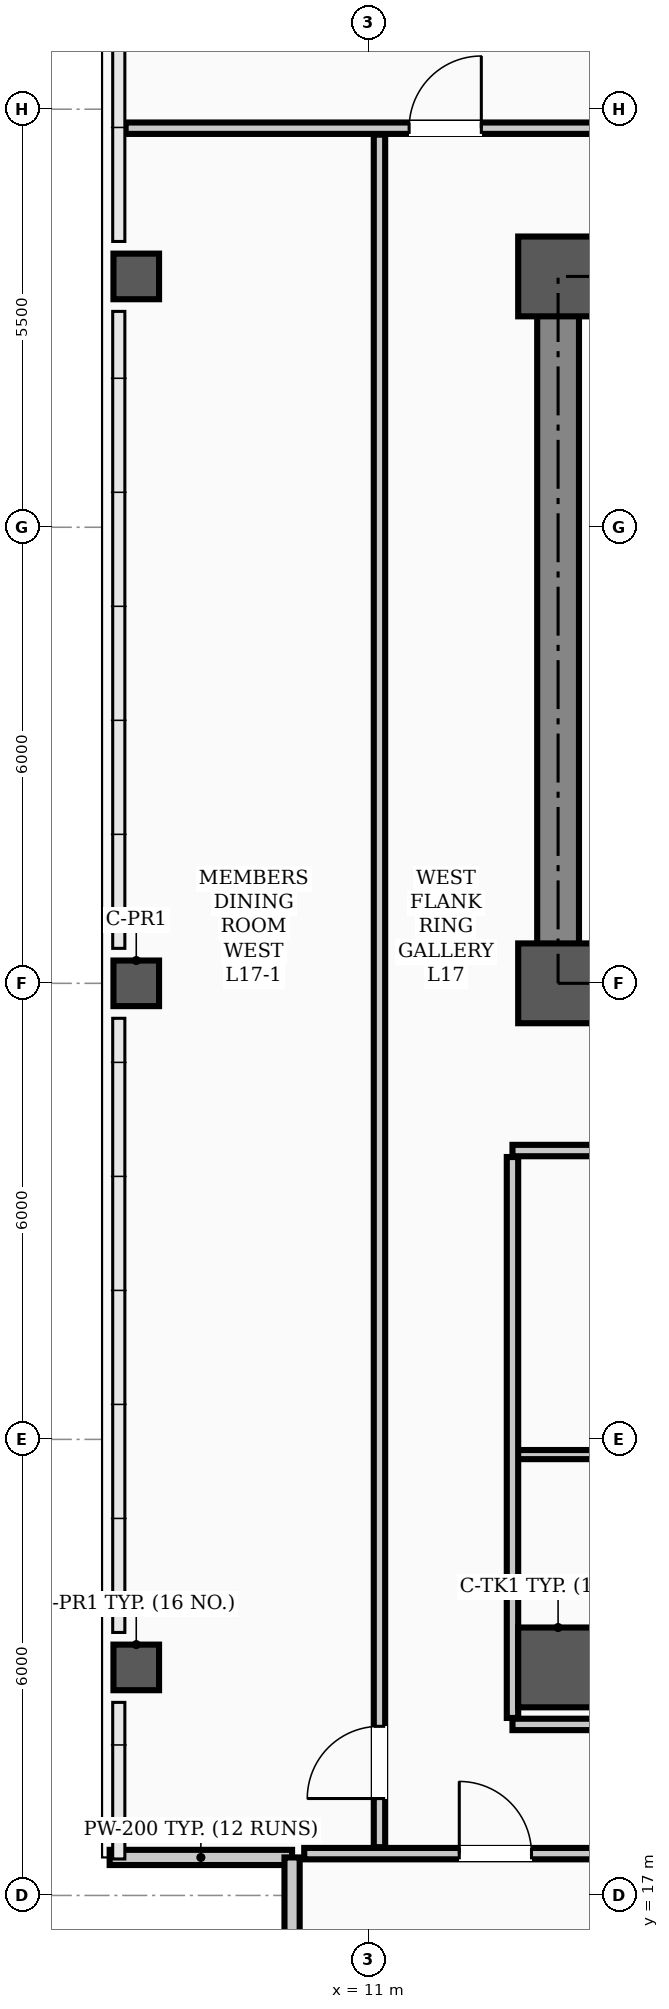
"""IFC4 building model, lengths in metres.
Left out: names, types, materials, properties, quantities, classifications, styles, units other than length and angle.
Written with IfcOpenShell. Run it as: python <this file> out.ifc"""

import sys

from ifc_helpers import new_model, si_unit, direction, frame, frame_2d, origin, origin_2d, place, context, subcontext, project, spatial, rectangle, hollow_rectangle, extrude, element, fill, save


model = new_model("IFC4")
c1 = context("Model", 3, precision=1e-05, world=origin(), true_north=direction((0.0, 1.0)))
c2 = subcontext(c1, "Body", "Model", "MODEL_VIEW")
j1 = project(units=[si_unit("LENGTHUNIT", "METRE"), si_unit("PLANEANGLEUNIT", "RADIAN")], contexts=[c1])
p1 = place(None, origin())
s1 = spatial("IfcSite", under=j1, at=p1, CompositionType="ELEMENT")
p2 = place(p1, origin())
s2 = spatial("IfcBuilding", under=s1, at=p2, CompositionType="ELEMENT")
p3 = place(p2, frame((0.0, 0.0, 69.4)))
s3 = spatial("IfcBuildingStorey", under=s2, at=p3, CompositionType="ELEMENT", Elevation=69.4)
for number, where, z_axis, x_axis in (
    (1, (13.5, 29.0, 0.0), (0.0, 0.0, 1.0), (1.0, 0.0, 0.0)),
    (2, (13.5, 38.3, 0.0), (0.0, 0.0, 1.0), (1.0, 0.0, 0.0)),
    (3, (13.5, 20.0, 0.0), (0.0, 0.0, 1.0), (1.0, 0.0, 0.0)),
):
    element("IfcColumn", number, at=place(p3, frame(where, z_axis=z_axis, x_axis=x_axis)), inside=s3, PredefinedType="COLUMN", context=c2, shape_type="SweptSolid", body=[
        extrude(hollow_rectangle(XDim=1.05, YDim=1.05, WallThickness=0.038, InnerFilletRadius=0.019, OuterFilletRadius=0.057, at=origin_2d()), origin(), (0.0, 0.0, 1.0), 3.9),
    ])
for number, where, z_axis, x_axis in (
    (4, (7.95, 20.0, 0.0), (0.0, 0.0, 1.0), (1.0, 0.0, 0.0)),
    (5, (7.95, 29.0, 0.0), (0.0, 0.0, 1.0), (1.0, 0.0, 0.0)),
    (6, (7.95, 38.3, 0.0), (0.0, 0.0, 1.0), (1.0, 0.0, 0.0)),
):
    element("IfcColumn", number, at=place(p3, frame(where, z_axis=z_axis, x_axis=x_axis)), inside=s3, PredefinedType="COLUMN", context=c2, shape_type="SweptSolid", body=[
        extrude(hollow_rectangle(XDim=0.6, YDim=0.6, WallThickness=0.026, InnerFilletRadius=0.013, OuterFilletRadius=0.039, at=origin_2d()), origin(), (0.0, 0.0, 1.0), 3.9),
    ])
for number, where, z_axis, x_axis in (
    (7, (7.6, 17.5, 0.0), (0.0, 0.0, 1.0), (1.0, 0.0, 0.0)),
    (8, (10.0, 17.5, 0.0), (0.0, 0.0, 1.0), (0.0, -1.0, 0.0)),
):
    element("IfcWall", number, at=place(p3, frame(where, z_axis=z_axis, x_axis=x_axis)), inside=s3, PredefinedType="PARAPET", context=c2, shape_type="SweptSolid", body=[
        extrude(rectangle(XDim=2.4, YDim=0.2, at=frame_2d((1.2, 0.0))), origin(), (0.0, 0.0, 1.0), 1.2),
    ])
p4 = place(p3, frame((13.5, 29.0, 0.0), z_axis=(0.0, 0.0, 1.0), x_axis=(1.0, 0.0, 0.0)))
e9 = element("IfcWall", 9, at=p4, inside=s3, PredefinedType="SHEAR", context=c2, shape_type="SweptSolid", body=[
    extrude(rectangle(XDim=30.5, YDim=0.55, at=frame_2d((15.25, 0.0))), origin(), (0.0, 0.0, 1.0), 3.72),
])
p5 = place(p4, frame((1.75, 0.0, 0.0)))
e10 = element("IfcOpeningElement", 10, at=p5, cuts=e9, PredefinedType="OPENING", context=c2, shape_type="SweptSolid", body=[
    extrude(rectangle(XDim=1.1, YDim=2.08, at=frame_2d((0.55, 1.04))), frame((0.0, 0.285, 0.0), z_axis=(0.0, -1.0, 0.0), x_axis=(1.0, 0.0, 0.0)), (0.0, 0.0, 1.0), 0.57),
])
p6 = place(p4, frame((26.7, 0.0, 0.0)))
e11 = element("IfcOpeningElement", 11, at=p6, cuts=e9, PredefinedType="OPENING", context=c2, shape_type="SweptSolid", body=[
    extrude(rectangle(XDim=1.1, YDim=2.08, at=frame_2d((0.55, 1.04))), frame((0.0, 0.285, 0.0), z_axis=(0.0, -1.0, 0.0), x_axis=(1.0, 0.0, 0.0)), (0.0, 0.0, 1.0), 0.57),
])
p7 = place(p4, frame((6.8, 0.0, 0.0)))
e12 = element("IfcOpeningElement", 12, at=p7, cuts=e9, PredefinedType="OPENING", context=c2, shape_type="SweptSolid", body=[
    extrude(rectangle(XDim=1.1, YDim=2.08, at=frame_2d((0.55, 1.04))), frame((0.0, 0.285, 0.0), z_axis=(0.0, -1.0, 0.0), x_axis=(1.0, 0.0, 0.0)), (0.0, 0.0, 1.0), 0.57),
])
p8 = place(p4, frame((13.2, 0.0, 0.0)))
e13 = element("IfcOpeningElement", 13, at=p8, cuts=e9, PredefinedType="OPENING", context=c2, shape_type="SweptSolid", body=[
    extrude(rectangle(XDim=1.6, YDim=2.08, at=frame_2d((0.8, 1.04))), frame((0.0, 0.285, 0.0), z_axis=(0.0, -1.0, 0.0), x_axis=(1.0, 0.0, 0.0)), (0.0, 0.0, 1.0), 0.57),
])
p9 = place(p4, frame((19.5, 0.0, 0.0)))
e14 = element("IfcOpeningElement", 14, at=p9, cuts=e9, PredefinedType="OPENING", context=c2, shape_type="SweptSolid", body=[
    extrude(rectangle(XDim=0.9, YDim=2.08, at=frame_2d((0.45, 1.04))), frame((0.0, 0.285, 0.0), z_axis=(0.0, -1.0, 0.0), x_axis=(1.0, 0.0, 0.0)), (0.0, 0.0, 1.0), 0.57),
])
p10 = place(p4, frame((21.55, 0.0, 0.0)))
e15 = element("IfcOpeningElement", 15, at=p10, cuts=e9, PredefinedType="OPENING", context=c2, shape_type="SweptSolid", body=[
    extrude(rectangle(XDim=0.9, YDim=2.08, at=frame_2d((0.45, 1.04))), frame((0.0, 0.285, 0.0), z_axis=(0.0, -1.0, 0.0), x_axis=(1.0, 0.0, 0.0)), (0.0, 0.0, 1.0), 0.57),
])
p11 = place(p3, frame((13.5, 38.3, 0.0), z_axis=(0.0, 0.0, 1.0), x_axis=(1.0, 0.0, 0.0)))
e16 = element("IfcWall", 16, at=p11, inside=s3, PredefinedType="SHEAR", context=c2, shape_type="SweptSolid", body=[
    extrude(rectangle(XDim=30.5, YDim=0.55, at=frame_2d((15.25, 0.0))), origin(), (0.0, 0.0, 1.0), 3.72),
])
p12 = place(p3, frame((13.5, 29.35, 0.0), z_axis=(0.0, 0.0, 1.0), x_axis=(0.0, 1.0, 0.0)))
e17 = element("IfcWall", 17, at=p12, inside=s3, PredefinedType="SHEAR", context=c2, shape_type="SweptSolid", body=[
    extrude(rectangle(XDim=8.6, YDim=0.55, at=frame_2d((4.3, 0.0))), origin(), (0.0, 0.0, 1.0), 3.72),
])
p13 = place(p3, frame((12.9, 26.8, 0.0), z_axis=(0.0, 0.0, 1.0), x_axis=(1.0, 0.0, 0.0)))
e18 = element("IfcWall", 18, at=p13, inside=s3, PredefinedType="PARTITIONING", context=c2, shape_type="SweptSolid", body=[
    extrude(rectangle(XDim=31.7, YDim=0.15, at=frame_2d((15.85, 0.0))), origin(), (0.0, 0.0, 1.0), 3.1),
])
p14 = place(p13, frame((13.6, 0.0, 0.0)))
e19 = element("IfcOpeningElement", 19, at=p14, cuts=e18, PredefinedType="OPENING", context=c2, shape_type="SweptSolid", body=[
    extrude(rectangle(XDim=1.6, YDim=2.08, at=frame_2d((0.8, 1.04))), frame((0.0, 0.085, 0.0), z_axis=(0.0, -1.0, 0.0), x_axis=(1.0, 0.0, 0.0)), (0.0, 0.0, 1.0), 0.17),
])
p15 = place(p13, frame((2.475, 0.0, 0.0)))
e20 = element("IfcOpeningElement", 20, at=p15, cuts=e18, PredefinedType="OPENING", context=c2, shape_type="SweptSolid", body=[
    extrude(rectangle(XDim=0.95, YDim=2.08, at=frame_2d((0.475, 1.04))), frame((0.0, 0.085, 0.0), z_axis=(0.0, -1.0, 0.0), x_axis=(1.0, 0.0, 0.0)), (0.0, 0.0, 1.0), 0.17),
])
p16 = place(p13, frame((9.125, 0.0, 0.0)))
e21 = element("IfcOpeningElement", 21, at=p16, cuts=e18, PredefinedType="OPENING", context=c2, shape_type="SweptSolid", body=[
    extrude(rectangle(XDim=0.95, YDim=2.08, at=frame_2d((0.475, 1.04))), frame((0.0, 0.085, 0.0), z_axis=(0.0, -1.0, 0.0), x_axis=(1.0, 0.0, 0.0)), (0.0, 0.0, 1.0), 0.17),
])
p17 = place(p13, frame((19.125, 0.0, 0.0)))
e22 = element("IfcOpeningElement", 22, at=p17, cuts=e18, PredefinedType="OPENING", context=c2, shape_type="SweptSolid", body=[
    extrude(rectangle(XDim=0.95, YDim=2.08, at=frame_2d((0.475, 1.04))), frame((0.0, 0.085, 0.0), z_axis=(0.0, -1.0, 0.0), x_axis=(1.0, 0.0, 0.0)), (0.0, 0.0, 1.0), 0.17),
])
p18 = place(p13, frame((26.325, 0.0, 0.0)))
e23 = element("IfcOpeningElement", 23, at=p18, cuts=e18, PredefinedType="OPENING", context=c2, shape_type="SweptSolid", body=[
    extrude(rectangle(XDim=0.95, YDim=2.08, at=frame_2d((0.475, 1.04))), frame((0.0, 0.085, 0.0), z_axis=(0.0, -1.0, 0.0), x_axis=(1.0, 0.0, 0.0)), (0.0, 0.0, 1.0), 0.17),
])
p19 = place(p3, frame((10.16, 17.55, 0.0), z_axis=(0.0, 0.0, 1.0), x_axis=(1.0, 0.0, 0.0)))
e24 = element("IfcWall", 24, at=p19, inside=s3, PredefinedType="PARTITIONING", context=c2, shape_type="SweptSolid", body=[
    extrude(rectangle(XDim=44.68, YDim=0.15, at=frame_2d((22.34, 0.0))), origin(), (0.0, 0.0, 1.0), 3.1),
])
p20 = place(p19, frame((2.04, 0.0, 0.0)))
e25 = element("IfcOpeningElement", 25, at=p20, cuts=e24, PredefinedType="OPENING", context=c2, shape_type="SweptSolid", body=[
    extrude(rectangle(XDim=0.95, YDim=2.08, at=frame_2d((0.475, 1.04))), frame((0.0, 0.085, 0.0), z_axis=(0.0, -1.0, 0.0), x_axis=(1.0, 0.0, 0.0)), (0.0, 0.0, 1.0), 0.17),
])
p21 = place(p19, frame((6.565, 0.0, 0.0)))
e26 = element("IfcOpeningElement", 26, at=p21, cuts=e24, PredefinedType="OPENING", context=c2, shape_type="SweptSolid", body=[
    extrude(rectangle(XDim=0.95, YDim=2.08, at=frame_2d((0.475, 1.04))), frame((0.0, 0.085, 0.0), z_axis=(0.0, -1.0, 0.0), x_axis=(1.0, 0.0, 0.0)), (0.0, 0.0, 1.0), 0.17),
])
p22 = place(p19, frame((11.865, 0.0, 0.0)))
e27 = element("IfcOpeningElement", 27, at=p22, cuts=e24, PredefinedType="OPENING", context=c2, shape_type="SweptSolid", body=[
    extrude(rectangle(XDim=0.95, YDim=2.08, at=frame_2d((0.475, 1.04))), frame((0.0, 0.085, 0.0), z_axis=(0.0, -1.0, 0.0), x_axis=(1.0, 0.0, 0.0)), (0.0, 0.0, 1.0), 0.17),
])
p23 = place(p19, frame((24.665, 0.0, 0.0)))
e28 = element("IfcOpeningElement", 28, at=p23, cuts=e24, PredefinedType="OPENING", context=c2, shape_type="SweptSolid", body=[
    extrude(rectangle(XDim=0.95, YDim=2.08, at=frame_2d((0.475, 1.04))), frame((0.0, 0.085, 0.0), z_axis=(0.0, -1.0, 0.0), x_axis=(1.0, 0.0, 0.0)), (0.0, 0.0, 1.0), 0.17),
])
p24 = place(p19, frame((31.765, 0.0, 0.0)))
e29 = element("IfcOpeningElement", 29, at=p24, cuts=e24, PredefinedType="OPENING", context=c2, shape_type="SweptSolid", body=[
    extrude(rectangle(XDim=0.95, YDim=2.08, at=frame_2d((0.475, 1.04))), frame((0.0, 0.085, 0.0), z_axis=(0.0, -1.0, 0.0), x_axis=(1.0, 0.0, 0.0)), (0.0, 0.0, 1.0), 0.17),
])
p25 = place(p3, frame((12.9, 19.25, 0.0), z_axis=(0.0, 0.0, 1.0), x_axis=(1.0, 0.0, 0.0)))
e30 = element("IfcWall", 30, at=p25, inside=s3, PredefinedType="PARTITIONING", context=c2, shape_type="SweptSolid", body=[
    extrude(rectangle(XDim=13.3, YDim=0.15, at=frame_2d((6.65, 0.0))), origin(), (0.0, 0.0, 1.0), 3.1),
])
p26 = place(p25, frame((2.475, 0.0, 0.0)))
e31 = element("IfcOpeningElement", 31, at=p26, cuts=e30, PredefinedType="OPENING", context=c2, shape_type="SweptSolid", body=[
    extrude(rectangle(XDim=0.95, YDim=2.08, at=frame_2d((0.475, 1.04))), frame((0.0, 0.085, 0.0), z_axis=(0.0, -1.0, 0.0), x_axis=(1.0, 0.0, 0.0)), (0.0, 0.0, 1.0), 0.17),
])
p27 = place(p25, frame((9.125, 0.0, 0.0)))
e32 = element("IfcOpeningElement", 32, at=p27, cuts=e30, PredefinedType="OPENING", context=c2, shape_type="SweptSolid", body=[
    extrude(rectangle(XDim=0.95, YDim=2.08, at=frame_2d((0.475, 1.04))), frame((0.0, 0.085, 0.0), z_axis=(0.0, -1.0, 0.0), x_axis=(1.0, 0.0, 0.0)), (0.0, 0.0, 1.0), 0.17),
])
p28 = place(p3, frame((12.9, 22.8, 0.0), z_axis=(0.0, 0.0, 1.0), x_axis=(1.0, 0.0, 0.0)))
e33 = element("IfcWall", 33, at=p28, inside=s3, PredefinedType="PARTITIONING", context=c2, shape_type="SweptSolid", body=[
    extrude(rectangle(XDim=5.9, YDim=0.12, at=frame_2d((2.95, 0.0))), origin(), (0.0, 0.0, 1.0), 3.1),
])
p29 = place(p3, frame((7.81, 40.25, 0.0), z_axis=(0.0, 0.0, 1.0), x_axis=(1.0, 0.0, 0.0)))
e34 = element("IfcWall", 34, at=p29, inside=s3, PredefinedType="PARTITIONING", context=c2, shape_type="SweptSolid", body=[
    extrude(rectangle(XDim=49.38, YDim=0.15, at=frame_2d((24.69, 0.0))), origin(), (0.0, 0.0, 1.0), 3.1),
])
p30 = place(p29, frame((3.73, 0.0, 0.0)))
e35 = element("IfcOpeningElement", 35, at=p30, cuts=e34, PredefinedType="OPENING", context=c2, shape_type="SweptSolid", body=[
    extrude(rectangle(XDim=0.95, YDim=2.08, at=frame_2d((0.475, 1.04))), frame((0.0, 0.085, 0.0), z_axis=(0.0, -1.0, 0.0), x_axis=(1.0, 0.0, 0.0)), (0.0, 0.0, 1.0), 0.17),
])
p31 = place(p29, frame((11.015, 0.0, 0.0)))
e36 = element("IfcOpeningElement", 36, at=p31, cuts=e34, PredefinedType="OPENING", context=c2, shape_type="SweptSolid", body=[
    extrude(rectangle(XDim=0.95, YDim=2.08, at=frame_2d((0.475, 1.04))), frame((0.0, 0.085, 0.0), z_axis=(0.0, -1.0, 0.0), x_axis=(1.0, 0.0, 0.0)), (0.0, 0.0, 1.0), 0.17),
])
p32 = place(p29, frame((18.215, 0.0, 0.0)))
e37 = element("IfcOpeningElement", 37, at=p32, cuts=e34, PredefinedType="OPENING", context=c2, shape_type="SweptSolid", body=[
    extrude(rectangle(XDim=0.95, YDim=2.08, at=frame_2d((0.475, 1.04))), frame((0.0, 0.085, 0.0), z_axis=(0.0, -1.0, 0.0), x_axis=(1.0, 0.0, 0.0)), (0.0, 0.0, 1.0), 0.17),
])
p33 = place(p29, frame((25.515, 0.0, 0.0)))
e38 = element("IfcOpeningElement", 38, at=p33, cuts=e34, PredefinedType="OPENING", context=c2, shape_type="SweptSolid", body=[
    extrude(rectangle(XDim=0.95, YDim=2.08, at=frame_2d((0.475, 1.04))), frame((0.0, 0.085, 0.0), z_axis=(0.0, -1.0, 0.0), x_axis=(1.0, 0.0, 0.0)), (0.0, 0.0, 1.0), 0.17),
])
p34 = place(p29, frame((31.915, 0.0, 0.0)))
e39 = element("IfcOpeningElement", 39, at=p34, cuts=e34, PredefinedType="OPENING", context=c2, shape_type="SweptSolid", body=[
    extrude(rectangle(XDim=0.95, YDim=2.08, at=frame_2d((0.475, 1.04))), frame((0.0, 0.085, 0.0), z_axis=(0.0, -1.0, 0.0), x_axis=(1.0, 0.0, 0.0)), (0.0, 0.0, 1.0), 0.17),
])
p35 = place(p29, frame((37.2, 0.0, 0.0)))
e40 = element("IfcOpeningElement", 40, at=p35, cuts=e34, PredefinedType="OPENING", context=c2, shape_type="SweptSolid", body=[
    extrude(rectangle(XDim=0.95, YDim=2.08, at=frame_2d((0.475, 1.04))), frame((0.0, 0.085, 0.0), z_axis=(0.0, -1.0, 0.0), x_axis=(1.0, 0.0, 0.0)), (0.0, 0.0, 1.0), 0.17),
])
p36 = place(p3, frame((11.15, 17.635, 0.0), z_axis=(0.0, 0.0, 1.0), x_axis=(0.0, 1.0, 0.0)))
e41 = element("IfcWall", 41, at=p36, inside=s3, PredefinedType="PARTITIONING", context=c2, shape_type="SweptSolid", body=[
    extrude(rectangle(XDim=22.53, YDim=0.15, at=frame_2d((11.265, 0.0))), origin(), (0.0, 0.0, 1.0), 3.0),
])
p37 = place(p36, frame((0.64, 0.0, 0.0)))
e42 = element("IfcOpeningElement", 42, at=p37, cuts=e41, PredefinedType="OPENING", context=c2, shape_type="SweptSolid", body=[
    extrude(rectangle(XDim=0.95, YDim=2.08, at=frame_2d((0.475, 1.04))), frame((0.0, 0.085, 0.0), z_axis=(0.0, -1.0, 0.0), x_axis=(1.0, 0.0, 0.0)), (0.0, 0.0, 1.0), 0.17),
])
p38 = place(p3, frame((12.9, 19.335, 0.0), z_axis=(0.0, 0.0, 1.0), x_axis=(0.0, 1.0, 0.0)))
e43 = element("IfcWall", 43, at=p38, inside=s3, PredefinedType="PARTITIONING", context=c2, shape_type="SweptSolid", body=[
    extrude(rectangle(XDim=7.38, YDim=0.15, at=frame_2d((3.69, 0.0))), origin(), (0.0, 0.0, 1.0), 3.0),
])
p39 = place(p20, origin())
e44 = element("IfcDoor", 44, at=p39, inside=s3, OperationType="SINGLE_SWING_LEFT", PredefinedType="DOOR", context=c2, shape_type="SweptSolid", body=[
    extrude(rectangle(XDim=0.95, YDim=2.08, at=frame_2d((0.475, 1.04))), frame((0.0, 0.025, 0.0), z_axis=(0.0, -1.0, 0.0), x_axis=(1.0, 0.0, 0.0)), (0.0, 0.0, 1.0), 0.05),
])
fill(e25, e44)
p40 = place(p37, origin())
e45 = element("IfcDoor", 45, at=p40, inside=s3, OperationType="SINGLE_SWING_LEFT", PredefinedType="DOOR", context=c2, shape_type="SweptSolid", body=[
    extrude(rectangle(XDim=0.95, YDim=2.08, at=frame_2d((0.475, 1.04))), frame((0.0, 0.025, 0.0), z_axis=(0.0, -1.0, 0.0), x_axis=(1.0, 0.0, 0.0)), (0.0, 0.0, 1.0), 0.05),
])
fill(e42, e45)
p41 = place(p30, origin())
e46 = element("IfcDoor", 46, at=p41, inside=s3, OperationType="SINGLE_SWING_RIGHT", PredefinedType="DOOR", context=c2, shape_type="SweptSolid", body=[
    extrude(rectangle(XDim=0.95, YDim=2.08, at=frame_2d((0.475, 1.04))), frame((0.0, 0.025, 0.0), z_axis=(0.0, -1.0, 0.0), x_axis=(1.0, 0.0, 0.0)), (0.0, 0.0, 1.0), 0.05),
])
fill(e35, e46)
save(model, sys.argv[1])
